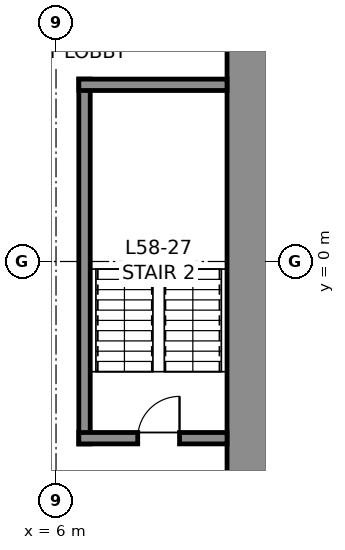
"""IFC4 building model, lengths in metres.
Left out: names, types, materials, properties, quantities, classifications, styles, units other than length and angle.
Written with IfcOpenShell. Run it as: python <this file> out.ifc"""

import sys

from ifc_helpers import new_model, si_unit, direction, frame, frame_2d, origin, place, context, subcontext, project, spatial, rectangle, extrude, element, fill, save


model = new_model("IFC4")
c1 = context("Model", 3, precision=1e-05, world=origin(), true_north=direction((0.0, 1.0)))
c2 = subcontext(c1, "Body", "Model", "MODEL_VIEW")
j1 = project(units=[si_unit("LENGTHUNIT", "METRE"), si_unit("PLANEANGLEUNIT", "RADIAN")], contexts=[c1])
p1 = place(None, origin())
s1 = spatial("IfcSite", under=j1, at=p1, CompositionType="ELEMENT")
p2 = place(p1, origin())
s2 = spatial("IfcBuilding", under=s1, at=p2, CompositionType="ELEMENT")
p3 = place(p2, frame((0.0, 0.0, 261.8)))
s3 = spatial("IfcBuildingStorey", under=s2, at=p3, CompositionType="ELEMENT", Elevation=261.8)
p4 = place(p3, frame((11.25, 10.5, 0.0), z_axis=(0.0, 0.0, 1.0), x_axis=(0.0, -1.0, 0.0)))
e1 = element("IfcWall", 1, at=p4, inside=s3, PredefinedType="SHEAR", context=c2, shape_type="SweptSolid", body=[
    extrude(rectangle(XDim=21.0, YDim=1.5, at=frame_2d((10.5, 0.0))), origin(), (0.0, 0.0, 1.0), 4.0),
])
p5 = place(p4, frame((3.7, 0.0, 0.0)))
e2 = element("IfcOpeningElement", 2, at=p5, cuts=e1, PredefinedType="OPENING", context=c2, shape_type="SweptSolid", body=[
    extrude(rectangle(XDim=1.2, YDim=2.3, at=frame_2d((0.6, 1.15))), frame((0.0, 0.76, 0.0), z_axis=(0.0, -1.0, 0.0), x_axis=(1.0, 0.0, 0.0)), (0.0, 0.0, 1.0), 1.52),
])
p6 = place(p4, frame((16.1, 0.0, 0.0)))
e3 = element("IfcOpeningElement", 3, at=p6, cuts=e1, PredefinedType="OPENING", context=c2, shape_type="SweptSolid", body=[
    extrude(rectangle(XDim=1.2, YDim=2.3, at=frame_2d((0.6, 1.15))), frame((0.0, 0.76, 0.0), z_axis=(0.0, -1.0, 0.0), x_axis=(1.0, 0.0, 0.0)), (0.0, 0.0, 1.0), 1.52),
])
p7 = place(p3, frame((6.75, -4.8, 0.0), z_axis=(0.0, 0.0, 1.0), x_axis=(0.0, 1.0, 0.0)))
e4 = element("IfcWall", 4, at=p7, inside=s3, PredefinedType="SOLIDWALL", context=c2, shape_type="SweptSolid", body=[
    extrude(rectangle(XDim=9.6, YDim=0.3, at=frame_2d((4.8, 0.0))), origin(), (0.0, 0.0, 1.0), 3.75),
])
p8 = place(p3, frame((6.6, 4.65, 0.0), z_axis=(0.0, 0.0, 1.0), x_axis=(1.0, 0.0, 0.0)))
e5 = element("IfcWall", 5, at=p8, inside=s3, PredefinedType="SOLIDWALL", context=c2, shape_type="SweptSolid", body=[
    extrude(rectangle(XDim=3.9, YDim=0.3, at=frame_2d((1.95, 0.0))), origin(), (0.0, 0.0, 1.0), 3.75),
])
p9 = place(p3, frame((10.5, -4.65, 0.0), z_axis=(0.0, 0.0, 1.0), x_axis=(-1.0, 0.0, 0.0)))
e6 = element("IfcWall", 6, at=p9, inside=s3, PredefinedType="SOLIDWALL", context=c2, shape_type="SweptSolid", body=[
    extrude(rectangle(XDim=3.9, YDim=0.3, at=frame_2d((1.95, 0.0))), origin(), (0.0, 0.0, 1.0), 3.75),
])
p10 = place(p9, frame((1.25, 0.0, 0.0)))
e7 = element("IfcOpeningElement", 7, at=p10, cuts=e6, PredefinedType="OPENING", context=c2, shape_type="SweptSolid", body=[
    extrude(rectangle(XDim=1.1, YDim=2.3, at=frame_2d((0.55, 1.15))), frame((0.0, 0.16, 0.0), z_axis=(0.0, -1.0, 0.0), x_axis=(1.0, 0.0, 0.0)), (0.0, 0.0, 1.0), 0.32),
])
p11 = place(p10, frame((1.1, 0.0, 0.0), z_axis=(0.0, 0.0, 1.0), x_axis=(-1.0, 0.0, 0.0)))
e8 = element("IfcDoor", 8, at=p11, inside=s3, OperationType="SINGLE_SWING_RIGHT", PredefinedType="DOOR", context=c2, shape_type="SweptSolid", body=[
    extrude(rectangle(XDim=1.1, YDim=2.3, at=frame_2d((0.55, 1.15))), frame((0.0, 0.025, 0.0), z_axis=(0.0, -1.0, 0.0), x_axis=(1.0, 0.0, 0.0)), (0.0, 0.0, 1.0), 0.05),
])
fill(e7, e8)
save(model, sys.argv[1])
